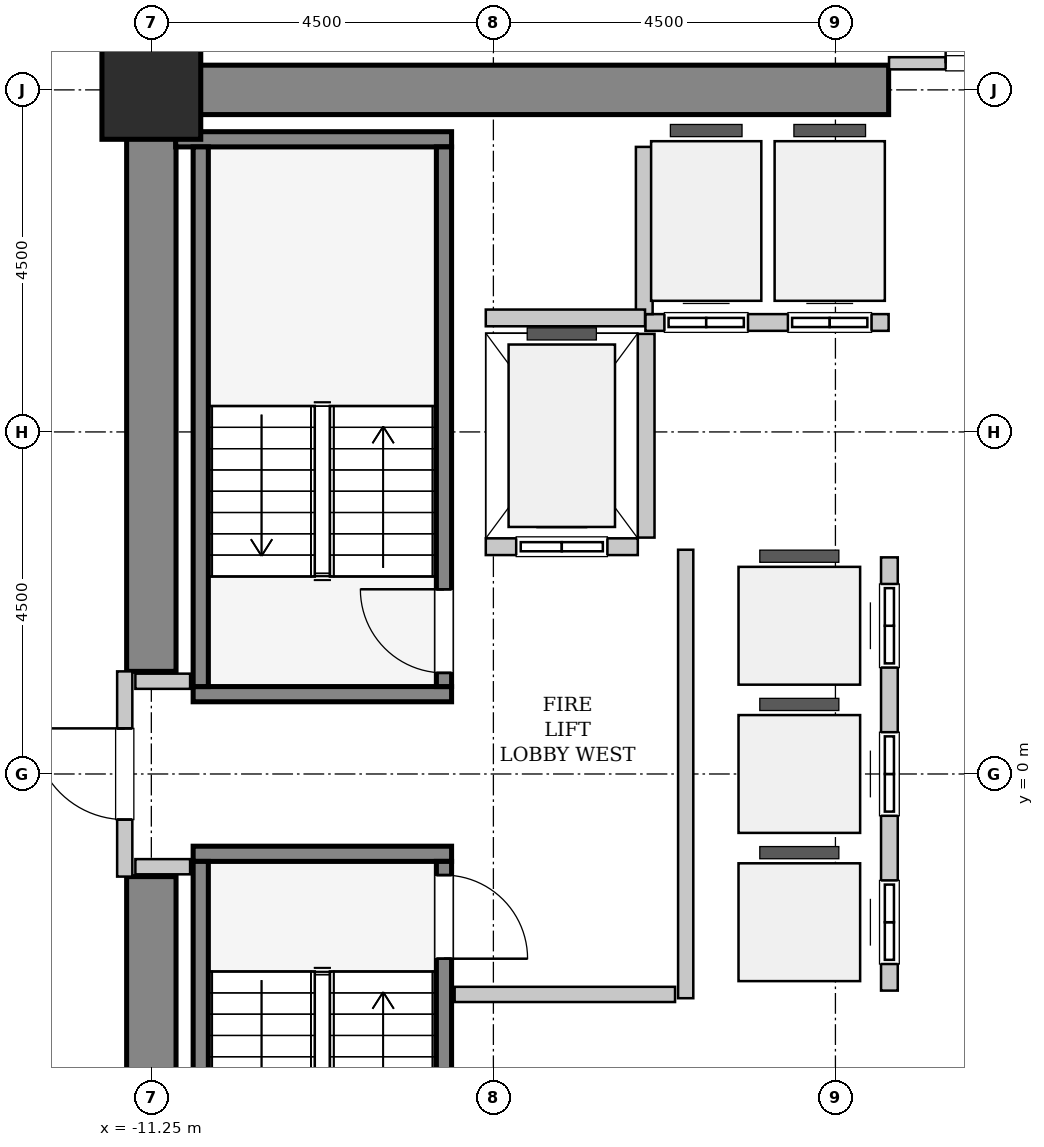
"""IFC4 building model, lengths in metres.
Left out: names, types, materials, properties, quantities, classifications, styles, units other than length and angle.
Written with IfcOpenShell. Run it as: python <this file> out.ifc"""

import sys

from ifc_helpers import new_model, si_unit, direction, frame, frame_2d, origin, origin_2d, place, context, subcontext, project, spatial, rectangle, hollow_rectangle, extrude, source, transform, mapped, element, fill, save


model = new_model("IFC4")
c1 = context("Model", 3, precision=1e-05, world=origin(), true_north=direction((0.0, 1.0)))
c2 = subcontext(c1, "Body", "Model", "MODEL_VIEW")
j1 = project(units=[si_unit("LENGTHUNIT", "METRE"), si_unit("PLANEANGLEUNIT", "RADIAN")], contexts=[c1])
p1 = place(None, origin())
s1 = spatial("IfcSite", under=j1, at=p1, CompositionType="ELEMENT")
p2 = place(p1, origin())
s2 = spatial("IfcBuilding", under=s1, at=p2, CompositionType="ELEMENT")
p3 = place(p2, origin())
s3 = spatial("IfcBuildingStorey", under=s2, at=p3, CompositionType="ELEMENT", Elevation=0.0)
m1 = source(origin(), c2, "Body", "SweptSolid", [
    extrude(rectangle(XDim=10.025, YDim=0.65, at=frame_2d((5.012, 0.0))), origin(), (0.0, 0.0, 1.0), 6.0),
])
p4 = place(p3, frame((-11.575, 9.0, 0.0), z_axis=(0.0, 0.0, 1.0), x_axis=(1.0, 0.0, 0.0)))
e1 = element("IfcWall", 1, at=p4, inside=s3, PredefinedType="SHEAR", context=c2, shape_type="MappedRepresentation", body=[
    mapped(m1, transform((0.0, 0.0, 0.0), x_axis=(1.0, 0.0, 0.0), y_axis=(0.0, 1.0, 0.0), z_axis=(0.0, 0.0, 1.0), scale=1.0)),
])
m2 = source(origin(), c2, "Body", "SweptSolid", [
    extrude(rectangle(XDim=7.325, YDim=0.65, at=frame_2d((3.663, 0.0))), origin(), (0.0, 0.0, 1.0), 6.0),
])
for number, where, z_axis, x_axis in (
    (2, (-11.25, -8.675, 0.0), (0.0, 0.0, 1.0), (0.0, 1.0, 0.0)),
    (3, (-11.25, 1.35, 0.0), (0.0, 0.0, 1.0), (0.0, 1.0, 0.0)),
):
    element("IfcWall", number, at=place(p3, frame(where, z_axis=z_axis, x_axis=x_axis)), inside=s3, PredefinedType="SHEAR", context=c2, shape_type="MappedRepresentation", body=[
        mapped(m2, transform((0.0, 0.0, 0.0), x_axis=(1.0, 0.0, 0.0), y_axis=(0.0, 1.0, 0.0), z_axis=(0.0, 0.0, 1.0), scale=1.0)),
    ])
m3 = source(origin(), c2, "Body", "SweptSolid", [
    extrude(hollow_rectangle(XDim=1.3, YDim=1.3, WallThickness=0.065, InnerFilletRadius=0.065, OuterFilletRadius=0.13, at=origin_2d()), origin(), (0.0, 0.0, 1.0), 6.0),
])
p5 = place(p3, frame((-11.25, 9.0, 0.0), z_axis=(0.0, 0.0, 1.0), x_axis=(1.0, 0.0, 0.0)))
e4 = element("IfcColumn", 4, at=p5, inside=s3, PredefinedType="COLUMN", context=c2, shape_type="MappedRepresentation", body=[
    mapped(m3, transform((0.0, 0.0, 0.0), x_axis=(1.0, 0.0, 0.0), y_axis=(0.0, 1.0, 0.0), z_axis=(0.0, 0.0, 1.0), scale=1.0)),
])
m4 = source(origin(), c2, "Body", "SweptSolid", [
    extrude(rectangle(XDim=3.4, YDim=0.2, at=frame_2d((1.7, 0.0))), origin(), (0.0, 0.0, 1.0), 6.0),
])
p6 = place(p3, frame((-7.3, 1.05, 0.0), z_axis=(0.0, 0.0, 1.0), x_axis=(-1.0, 0.0, 0.0)))
e5 = element("IfcWall", 5, at=p6, inside=s3, PredefinedType="SOLIDWALL", context=c2, shape_type="MappedRepresentation", body=[
    mapped(m4, transform((0.0, 0.0, 0.0), x_axis=(1.0, 0.0, 0.0), y_axis=(0.0, 1.0, 0.0), z_axis=(0.0, 0.0, 1.0), scale=1.0)),
])
m5 = source(origin(), c2, "Body", "SweptSolid", [
    extrude(rectangle(XDim=3.63, YDim=0.2, at=frame_2d((1.815, 0.0))), origin(), (0.0, 0.0, 1.0), 6.0),
])
p7 = place(p3, frame((-7.3, 8.35, 0.0), z_axis=(0.0, 0.0, 1.0), x_axis=(-1.0, 0.0, 0.0)))
e6 = element("IfcWall", 6, at=p7, inside=s3, PredefinedType="SOLIDWALL", context=c2, shape_type="MappedRepresentation", body=[
    mapped(m5, transform((0.0, 0.0, 0.0), x_axis=(1.0, 0.0, 0.0), y_axis=(0.0, 1.0, 0.0), z_axis=(0.0, 0.0, 1.0), scale=1.0)),
])
m6 = source(origin(), c2, "Body", "SweptSolid", [
    extrude(rectangle(XDim=7.1, YDim=0.2, at=frame_2d((3.55, 0.0))), origin(), (0.0, 0.0, 1.0), 6.0),
])
p8 = place(p3, frame((-7.4, 1.15, 0.0), z_axis=(0.0, 0.0, 1.0), x_axis=(0.0, 1.0, 0.0)))
e7 = element("IfcWall", 7, at=p8, inside=s3, PredefinedType="SOLIDWALL", context=c2, shape_type="MappedRepresentation", body=[
    mapped(m6, transform((0.0, 0.0, 0.0), x_axis=(1.0, 0.0, 0.0), y_axis=(0.0, 1.0, 0.0), z_axis=(0.0, 0.0, 1.0), scale=1.0)),
])
p9 = place(p8, frame((0.18, 0.0, 0.0)))
e8 = element("IfcOpeningElement", 8, at=p9, cuts=e7, PredefinedType="OPENING", context=c2, shape_type="SweptSolid", body=[
    extrude(rectangle(XDim=1.1, YDim=2.15, at=frame_2d((0.55, 1.075))), frame((0.0, 0.11, 0.0), z_axis=(0.0, -1.0, 0.0), x_axis=(1.0, 0.0, 0.0)), (0.0, 0.0, 1.0), 0.22),
])
p10 = place(p3, frame((-10.6, 1.15, 0.0), z_axis=(0.0, 0.0, 1.0), x_axis=(0.0, 1.0, 0.0)))
e9 = element("IfcWall", 9, at=p10, inside=s3, PredefinedType="SOLIDWALL", context=c2, shape_type="MappedRepresentation", body=[
    mapped(m6, transform((0.0, 0.0, 0.0), x_axis=(1.0, 0.0, 0.0), y_axis=(0.0, 1.0, 0.0), z_axis=(0.0, 0.0, 1.0), scale=1.0)),
])
p11 = place(p3, frame((-10.7, -1.05, 0.0), z_axis=(0.0, 0.0, 1.0), x_axis=(1.0, 0.0, 0.0)))
e10 = element("IfcWall", 10, at=p11, inside=s3, PredefinedType="SOLIDWALL", context=c2, shape_type="MappedRepresentation", body=[
    mapped(m4, transform((0.0, 0.0, 0.0), x_axis=(1.0, 0.0, 0.0), y_axis=(0.0, 1.0, 0.0), z_axis=(0.0, 0.0, 1.0), scale=1.0)),
])
p12 = place(p3, frame((-10.6, -1.15, 0.0), z_axis=(0.0, 0.0, 1.0), x_axis=(0.0, -1.0, 0.0)))
e11 = element("IfcWall", 11, at=p12, inside=s3, PredefinedType="SOLIDWALL", context=c2, shape_type="MappedRepresentation", body=[
    mapped(m6, transform((0.0, 0.0, 0.0), x_axis=(1.0, 0.0, 0.0), y_axis=(0.0, 1.0, 0.0), z_axis=(0.0, 0.0, 1.0), scale=1.0)),
])
p13 = place(p3, frame((-7.4, -1.15, 0.0), z_axis=(0.0, 0.0, 1.0), x_axis=(0.0, -1.0, 0.0)))
e12 = element("IfcWall", 12, at=p13, inside=s3, PredefinedType="SOLIDWALL", context=c2, shape_type="MappedRepresentation", body=[
    mapped(m6, transform((0.0, 0.0, 0.0), x_axis=(1.0, 0.0, 0.0), y_axis=(0.0, 1.0, 0.0), z_axis=(0.0, 0.0, 1.0), scale=1.0)),
])
p14 = place(p13, frame((0.18, 0.0, 0.0)))
e13 = element("IfcOpeningElement", 13, at=p14, cuts=e12, PredefinedType="OPENING", context=c2, shape_type="SweptSolid", body=[
    extrude(rectangle(XDim=1.1, YDim=2.15, at=frame_2d((0.55, 1.075))), frame((0.0, 0.11, 0.0), z_axis=(0.0, -1.0, 0.0), x_axis=(1.0, 0.0, 0.0)), (0.0, 0.0, 1.0), 0.22),
])
m7 = source(origin(), c2, "Body", "SweptSolid", [
    extrude(rectangle(XDim=2.0, YDim=0.22, at=frame_2d((1.0, 0.0))), origin(), (0.0, 0.0, 1.0), 5.685),
])
p15 = place(p3, frame((-6.85, 2.99, 0.0), z_axis=(0.0, 0.0, 1.0), x_axis=(1.0, 0.0, 0.0)))
e14 = element("IfcWall", 14, at=p15, inside=s3, PredefinedType="SOLIDWALL", context=c2, shape_type="MappedRepresentation", body=[
    mapped(m7, transform((0.0, 0.0, 0.0), x_axis=(1.0, 0.0, 0.0), y_axis=(0.0, 1.0, 0.0), z_axis=(0.0, 0.0, 1.0), scale=1.0)),
])
p16 = place(p15, frame((0.4, 0.0, 0.0)))
e15 = element("IfcOpeningElement", 15, at=p16, cuts=e14, PredefinedType="OPENING", context=c2, shape_type="SweptSolid", body=[
    extrude(rectangle(XDim=1.2, YDim=2.2, at=frame_2d((0.6, 1.1))), frame((0.0, 0.12, 0.0), z_axis=(0.0, -1.0, 0.0), x_axis=(1.0, 0.0, 0.0)), (0.0, 0.0, 1.0), 0.24),
])
m8 = source(origin(), c2, "Body", "SweptSolid", [
    extrude(rectangle(XDim=2.68, YDim=0.22, at=frame_2d((1.34, 0.0))), origin(), (0.0, 0.0, 1.0), 5.685),
])
p17 = place(p3, frame((-4.74, 3.11, 0.0), z_axis=(0.0, 0.0, 1.0), x_axis=(0.0, 1.0, 0.0)))
e16 = element("IfcWall", 16, at=p17, inside=s3, PredefinedType="SOLIDWALL", context=c2, shape_type="MappedRepresentation", body=[
    mapped(m8, transform((0.0, 0.0, 0.0), x_axis=(1.0, 0.0, 0.0), y_axis=(0.0, 1.0, 0.0), z_axis=(0.0, 0.0, 1.0), scale=1.0)),
])
m9 = source(origin(), c2, "Body", "SweptSolid", [
    extrude(rectangle(XDim=3.2, YDim=0.22, at=frame_2d((1.6, 0.0))), origin(), (0.0, 0.0, 1.0), 5.685),
])
p18 = place(p3, frame((-4.75, 5.94, 0.0), z_axis=(0.0, 0.0, 1.0), x_axis=(1.0, 0.0, 0.0)))
e17 = element("IfcWall", 17, at=p18, inside=s3, PredefinedType="SOLIDWALL", context=c2, shape_type="MappedRepresentation", body=[
    mapped(m9, transform((0.0, 0.0, 0.0), x_axis=(1.0, 0.0, 0.0), y_axis=(0.0, 1.0, 0.0), z_axis=(0.0, 0.0, 1.0), scale=1.0)),
])
p19 = place(p18, frame((0.25, 0.0, 0.0)))
e18 = element("IfcOpeningElement", 18, at=p19, cuts=e17, PredefinedType="OPENING", context=c2, shape_type="SweptSolid", body=[
    extrude(rectangle(XDim=1.1, YDim=2.2, at=frame_2d((0.55, 1.1))), frame((0.0, 0.12, 0.0), z_axis=(0.0, -1.0, 0.0), x_axis=(1.0, 0.0, 0.0)), (0.0, 0.0, 1.0), 0.24),
])
p20 = place(p18, frame((1.875, 0.0, 0.0)))
e19 = element("IfcOpeningElement", 19, at=p20, cuts=e17, PredefinedType="OPENING", context=c2, shape_type="SweptSolid", body=[
    extrude(rectangle(XDim=1.1, YDim=2.2, at=frame_2d((0.55, 1.1))), frame((0.0, 0.12, 0.0), z_axis=(0.0, -1.0, 0.0), x_axis=(1.0, 0.0, 0.0)), (0.0, 0.0, 1.0), 0.24),
])
m10 = source(origin(), c2, "Body", "SweptSolid", [
    extrude(rectangle(XDim=5.7, YDim=0.22, at=frame_2d((2.85, 0.0))), origin(), (0.0, 0.0, 1.0), 5.685),
])
p21 = place(p3, frame((-1.54, -2.85, 0.0), z_axis=(0.0, 0.0, 1.0), x_axis=(0.0, 1.0, 0.0)))
e20 = element("IfcWall", 20, at=p21, inside=s3, PredefinedType="SOLIDWALL", context=c2, shape_type="MappedRepresentation", body=[
    mapped(m10, transform((0.0, 0.0, 0.0), x_axis=(1.0, 0.0, 0.0), y_axis=(0.0, 1.0, 0.0), z_axis=(0.0, 0.0, 1.0), scale=1.0)),
])
p22 = place(p21, frame((0.35, 0.0, 0.0)))
e21 = element("IfcOpeningElement", 21, at=p22, cuts=e20, PredefinedType="OPENING", context=c2, shape_type="SweptSolid", body=[
    extrude(rectangle(XDim=1.1, YDim=2.2, at=frame_2d((0.55, 1.1))), frame((0.0, 0.12, 0.0), z_axis=(0.0, -1.0, 0.0), x_axis=(1.0, 0.0, 0.0)), (0.0, 0.0, 1.0), 0.24),
])
p23 = place(p21, frame((2.3, 0.0, 0.0)))
e22 = element("IfcOpeningElement", 22, at=p23, cuts=e20, PredefinedType="OPENING", context=c2, shape_type="SweptSolid", body=[
    extrude(rectangle(XDim=1.1, YDim=2.2, at=frame_2d((0.55, 1.1))), frame((0.0, 0.12, 0.0), z_axis=(0.0, -1.0, 0.0), x_axis=(1.0, 0.0, 0.0)), (0.0, 0.0, 1.0), 0.24),
])
p24 = place(p21, frame((4.25, 0.0, 0.0)))
e23 = element("IfcOpeningElement", 23, at=p24, cuts=e20, PredefinedType="OPENING", context=c2, shape_type="SweptSolid", body=[
    extrude(rectangle(XDim=1.1, YDim=2.2, at=frame_2d((0.55, 1.1))), frame((0.0, 0.12, 0.0), z_axis=(0.0, -1.0, 0.0), x_axis=(1.0, 0.0, 0.0)), (0.0, 0.0, 1.0), 0.24),
])
m11 = source(origin(), c2, "Body", "SweptSolid", [
    extrude(rectangle(XDim=2.2, YDim=0.22, at=frame_2d((1.1, 0.0))), origin(), (0.0, 0.0, 1.0), 5.685),
])
p25 = place(p3, frame((-4.765, 6.05, 0.0), z_axis=(0.0, 0.0, 1.0), x_axis=(0.0, 1.0, 0.0)))
e24 = element("IfcWall", 24, at=p25, inside=s3, PredefinedType="SOLIDWALL", context=c2, shape_type="MappedRepresentation", body=[
    mapped(m11, transform((0.0, 0.0, 0.0), x_axis=(1.0, 0.0, 0.0), y_axis=(0.0, 1.0, 0.0), z_axis=(0.0, 0.0, 1.0), scale=1.0)),
])
m12 = source(origin(), c2, "Body", "SweptSolid", [
    extrude(rectangle(XDim=2.095, YDim=0.22, at=frame_2d((1.048, 0.0))), origin(), (0.0, 0.0, 1.0), 5.685),
])
p26 = place(p3, frame((-6.85, 6.0, 0.0), z_axis=(0.0, 0.0, 1.0), x_axis=(1.0, 0.0, 0.0)))
e25 = element("IfcWall", 25, at=p26, inside=s3, PredefinedType="SOLIDWALL", context=c2, shape_type="MappedRepresentation", body=[
    mapped(m12, transform((0.0, 0.0, 0.0), x_axis=(1.0, 0.0, 0.0), y_axis=(0.0, 1.0, 0.0), z_axis=(0.0, 0.0, 1.0), scale=1.0)),
])
m13 = source(origin(), c2, "Body", "SweptSolid", [
    extrude(rectangle(XDim=2.7, YDim=0.2, at=frame_2d((1.35, 0.0))), origin(), (0.0, 0.0, 1.0), 4.575),
])
p27 = place(p3, frame((-11.6, -1.35, 0.0), z_axis=(0.0, 0.0, 1.0), x_axis=(0.0, 1.0, 0.0)))
e26 = element("IfcWall", 26, at=p27, inside=s3, PredefinedType="PARTITIONING", context=c2, shape_type="MappedRepresentation", body=[
    mapped(m13, transform((0.0, 0.0, 0.0), x_axis=(1.0, 0.0, 0.0), y_axis=(0.0, 1.0, 0.0), z_axis=(0.0, 0.0, 1.0), scale=1.0)),
])
p28 = place(p27, frame((0.75, 0.0, 0.0)))
e27 = element("IfcOpeningElement", 27, at=p28, cuts=e26, PredefinedType="OPENING", context=c2, shape_type="SweptSolid", body=[
    extrude(rectangle(XDim=1.2, YDim=2.15, at=frame_2d((0.6, 1.075))), frame((0.0, 0.11, 0.0), z_axis=(0.0, -1.0, 0.0), x_axis=(1.0, 0.0, 0.0)), (0.0, 0.0, 1.0), 0.22),
])
m14 = source(origin(), c2, "Body", "SweptSolid", [
    extrude(rectangle(XDim=5.9, YDim=0.2, at=frame_2d((2.95, 0.0))), origin(), (0.0, 0.0, 1.0), 5.685),
])
p29 = place(p3, frame((-4.22, -2.95, 0.0), z_axis=(0.0, 0.0, 1.0), x_axis=(0.0, 1.0, 0.0)))
e28 = element("IfcWall", 28, at=p29, inside=s3, PredefinedType="PARTITIONING", context=c2, shape_type="MappedRepresentation", body=[
    mapped(m14, transform((0.0, 0.0, 0.0), x_axis=(1.0, 0.0, 0.0), y_axis=(0.0, 1.0, 0.0), z_axis=(0.0, 0.0, 1.0), scale=1.0)),
])
m15 = source(origin(), c2, "Body", "SweptSolid", [
    extrude(rectangle(XDim=2.9, YDim=0.2, at=frame_2d((1.45, 0.0))), origin(), (0.0, 0.0, 1.0), 5.685),
])
p30 = place(p3, frame((-7.26, -2.9, 0.0), z_axis=(0.0, 0.0, 1.0), x_axis=(1.0, 0.0, 0.0)))
e29 = element("IfcWall", 29, at=p30, inside=s3, PredefinedType="PARTITIONING", context=c2, shape_type="MappedRepresentation", body=[
    mapped(m15, transform((0.0, 0.0, 0.0), x_axis=(1.0, 0.0, 0.0), y_axis=(0.0, 1.0, 0.0), z_axis=(0.0, 0.0, 1.0), scale=1.0)),
])
m16 = source(origin(), c2, "Body", "SweptSolid", [
    extrude(rectangle(XDim=0.72, YDim=0.2, at=frame_2d((0.36, 0.0))), origin(), (0.0, 0.0, 1.0), 5.685),
])
for number, where, z_axis, x_axis in (
    (30, (-11.46, 1.22, 0.0), (0.0, 0.0, 1.0), (1.0, 0.0, 0.0)),
    (31, (-11.46, -1.22, 0.0), (0.0, 0.0, 1.0), (1.0, 0.0, 0.0)),
):
    element("IfcWall", number, at=place(p3, frame(where, z_axis=z_axis, x_axis=x_axis)), inside=s3, PredefinedType="PARTITIONING", context=c2, shape_type="MappedRepresentation", body=[
        mapped(m16, transform((0.0, 0.0, 0.0), x_axis=(1.0, 0.0, 0.0), y_axis=(0.0, 1.0, 0.0), z_axis=(0.0, 0.0, 1.0), scale=1.0)),
    ])
m17 = source(origin(), c2, "Body", "SweptSolid", [
    extrude(rectangle(XDim=3.09, YDim=0.16, at=frame_2d((1.545, 0.0))), origin(), (0.0, 0.0, 1.0), 4.575),
])
p31 = place(p3, frame((-1.545, 9.35, 0.0), z_axis=(0.0, 0.0, 1.0), x_axis=(1.0, 0.0, 0.0)))
e32 = element("IfcWall", 32, at=p31, inside=s3, PredefinedType="PARTITIONING", context=c2, shape_type="MappedRepresentation", body=[
    mapped(m17, transform((0.0, 0.0, 0.0), x_axis=(1.0, 0.0, 0.0), y_axis=(0.0, 1.0, 0.0), z_axis=(0.0, 0.0, 1.0), scale=1.0)),
])
p32 = place(p31, frame((0.745, 0.0, 0.0)))
e33 = element("IfcOpeningElement", 33, at=p32, cuts=e32, PredefinedType="OPENING", context=c2, shape_type="SweptSolid", body=[
    extrude(rectangle(XDim=1.6, YDim=2.3, at=frame_2d((0.8, 1.15))), frame((0.0, 0.09, 0.0), z_axis=(0.0, -1.0, 0.0), x_axis=(1.0, 0.0, 0.0)), (0.0, 0.0, 1.0), 0.18),
])
m18 = source(origin(), c2, "Body", "SweptSolid", [
    extrude(rectangle(XDim=1.1, YDim=2.15, at=frame_2d((0.55, 1.075))), frame((0.0, 0.025, 0.0), z_axis=(0.0, -1.0, 0.0), x_axis=(1.0, 0.0, 0.0)), (0.0, 0.0, 1.0), 0.05),
])
p33 = place(p9, frame((1.1, 0.0, 0.0), z_axis=(0.0, 0.0, 1.0), x_axis=(-1.0, 0.0, 0.0)))
e34 = element("IfcDoor", 34, at=p33, inside=s3, OperationType="SINGLE_SWING_RIGHT", PredefinedType="DOOR", context=c2, shape_type="MappedRepresentation", body=[
    mapped(m18, transform((0.0, 0.0, 0.0), x_axis=(1.0, 0.0, 0.0), y_axis=(0.0, 1.0, 0.0), z_axis=(0.0, 0.0, 1.0), scale=1.0)),
])
fill(e8, e34)
p34 = place(p14, origin())
e35 = element("IfcDoor", 35, at=p34, inside=s3, OperationType="SINGLE_SWING_RIGHT", PredefinedType="DOOR", context=c2, shape_type="MappedRepresentation", body=[
    mapped(m18, transform((0.0, 0.0, 0.0), x_axis=(1.0, 0.0, 0.0), y_axis=(0.0, 1.0, 0.0), z_axis=(0.0, 0.0, 1.0), scale=1.0)),
])
fill(e13, e35)
m19 = source(origin(), c2, "Body", "SweptSolid", [
    extrude(rectangle(XDim=1.2, YDim=2.2, at=frame_2d((0.6, 1.1))), frame((0.0, 0.025, 0.0), z_axis=(0.0, -1.0, 0.0), x_axis=(1.0, 0.0, 0.0)), (0.0, 0.0, 1.0), 0.05),
])
p35 = place(p16, origin())
e36 = element("IfcDoor", 36, at=p35, inside=s3, OperationType="SLIDING_TO_LEFT", PredefinedType="DOOR", context=c2, shape_type="MappedRepresentation", body=[
    mapped(m19, transform((0.0, 0.0, 0.0), x_axis=(1.0, 0.0, 0.0), y_axis=(0.0, 1.0, 0.0), z_axis=(0.0, 0.0, 1.0), scale=1.0)),
])
fill(e15, e36)
m20 = source(origin(), c2, "Body", "SweptSolid", [
    extrude(rectangle(XDim=1.1, YDim=2.2, at=frame_2d((0.55, 1.1))), frame((0.0, 0.025, 0.0), z_axis=(0.0, -1.0, 0.0), x_axis=(1.0, 0.0, 0.0)), (0.0, 0.0, 1.0), 0.05),
])
p36 = place(p19, origin())
e37 = element("IfcDoor", 37, at=p36, inside=s3, OperationType="DOUBLE_DOOR_SLIDING", PredefinedType="DOOR", context=c2, shape_type="MappedRepresentation", body=[
    mapped(m20, transform((0.0, 0.0, 0.0), x_axis=(1.0, 0.0, 0.0), y_axis=(0.0, 1.0, 0.0), z_axis=(0.0, 0.0, 1.0), scale=1.0)),
])
fill(e18, e37)
p37 = place(p20, origin())
e38 = element("IfcDoor", 38, at=p37, inside=s3, OperationType="DOUBLE_DOOR_SLIDING", PredefinedType="DOOR", context=c2, shape_type="MappedRepresentation", body=[
    mapped(m20, transform((0.0, 0.0, 0.0), x_axis=(1.0, 0.0, 0.0), y_axis=(0.0, 1.0, 0.0), z_axis=(0.0, 0.0, 1.0), scale=1.0)),
])
fill(e19, e38)
p38 = place(p22, origin())
e39 = element("IfcDoor", 39, at=p38, inside=s3, OperationType="DOUBLE_DOOR_SLIDING", PredefinedType="DOOR", context=c2, shape_type="MappedRepresentation", body=[
    mapped(m20, transform((0.0, 0.0, 0.0), x_axis=(1.0, 0.0, 0.0), y_axis=(0.0, 1.0, 0.0), z_axis=(0.0, 0.0, 1.0), scale=1.0)),
])
fill(e21, e39)
p39 = place(p23, origin())
e40 = element("IfcDoor", 40, at=p39, inside=s3, OperationType="DOUBLE_DOOR_SLIDING", PredefinedType="DOOR", context=c2, shape_type="MappedRepresentation", body=[
    mapped(m20, transform((0.0, 0.0, 0.0), x_axis=(1.0, 0.0, 0.0), y_axis=(0.0, 1.0, 0.0), z_axis=(0.0, 0.0, 1.0), scale=1.0)),
])
fill(e22, e40)
p40 = place(p24, origin())
e41 = element("IfcDoor", 41, at=p40, inside=s3, OperationType="DOUBLE_DOOR_SLIDING", PredefinedType="DOOR", context=c2, shape_type="MappedRepresentation", body=[
    mapped(m20, transform((0.0, 0.0, 0.0), x_axis=(1.0, 0.0, 0.0), y_axis=(0.0, 1.0, 0.0), z_axis=(0.0, 0.0, 1.0), scale=1.0)),
])
fill(e23, e41)
m21 = source(origin(), c2, "Body", "SweptSolid", [
    extrude(rectangle(XDim=1.2, YDim=2.15, at=frame_2d((0.6, 1.075))), frame((0.0, 0.025, 0.0), z_axis=(0.0, -1.0, 0.0), x_axis=(1.0, 0.0, 0.0)), (0.0, 0.0, 1.0), 0.05),
])
p41 = place(p28, origin())
e42 = element("IfcDoor", 42, at=p41, inside=s3, OperationType="SINGLE_SWING_RIGHT", PredefinedType="DOOR", context=c2, shape_type="MappedRepresentation", body=[
    mapped(m21, transform((0.0, 0.0, 0.0), x_axis=(1.0, 0.0, 0.0), y_axis=(0.0, 1.0, 0.0), z_axis=(0.0, 0.0, 1.0), scale=1.0)),
])
fill(e27, e42)
m22 = source(origin(), c2, "Body", "SweptSolid", [
    extrude(rectangle(XDim=1.6, YDim=2.3, at=frame_2d((0.8, 1.15))), frame((0.0, 0.025, 0.0), z_axis=(0.0, -1.0, 0.0), x_axis=(1.0, 0.0, 0.0)), (0.0, 0.0, 1.0), 0.05),
])
p42 = place(p32, origin())
e43 = element("IfcDoor", 43, at=p42, inside=s3, OperationType="DOUBLE_DOOR_SINGLE_SWING", PredefinedType="DOOR", context=c2, shape_type="MappedRepresentation", body=[
    mapped(m22, transform((0.0, 0.0, 0.0), x_axis=(1.0, 0.0, 0.0), y_axis=(0.0, 1.0, 0.0), z_axis=(0.0, 0.0, 1.0), scale=1.0)),
])
fill(e33, e43)
save(model, sys.argv[1])
